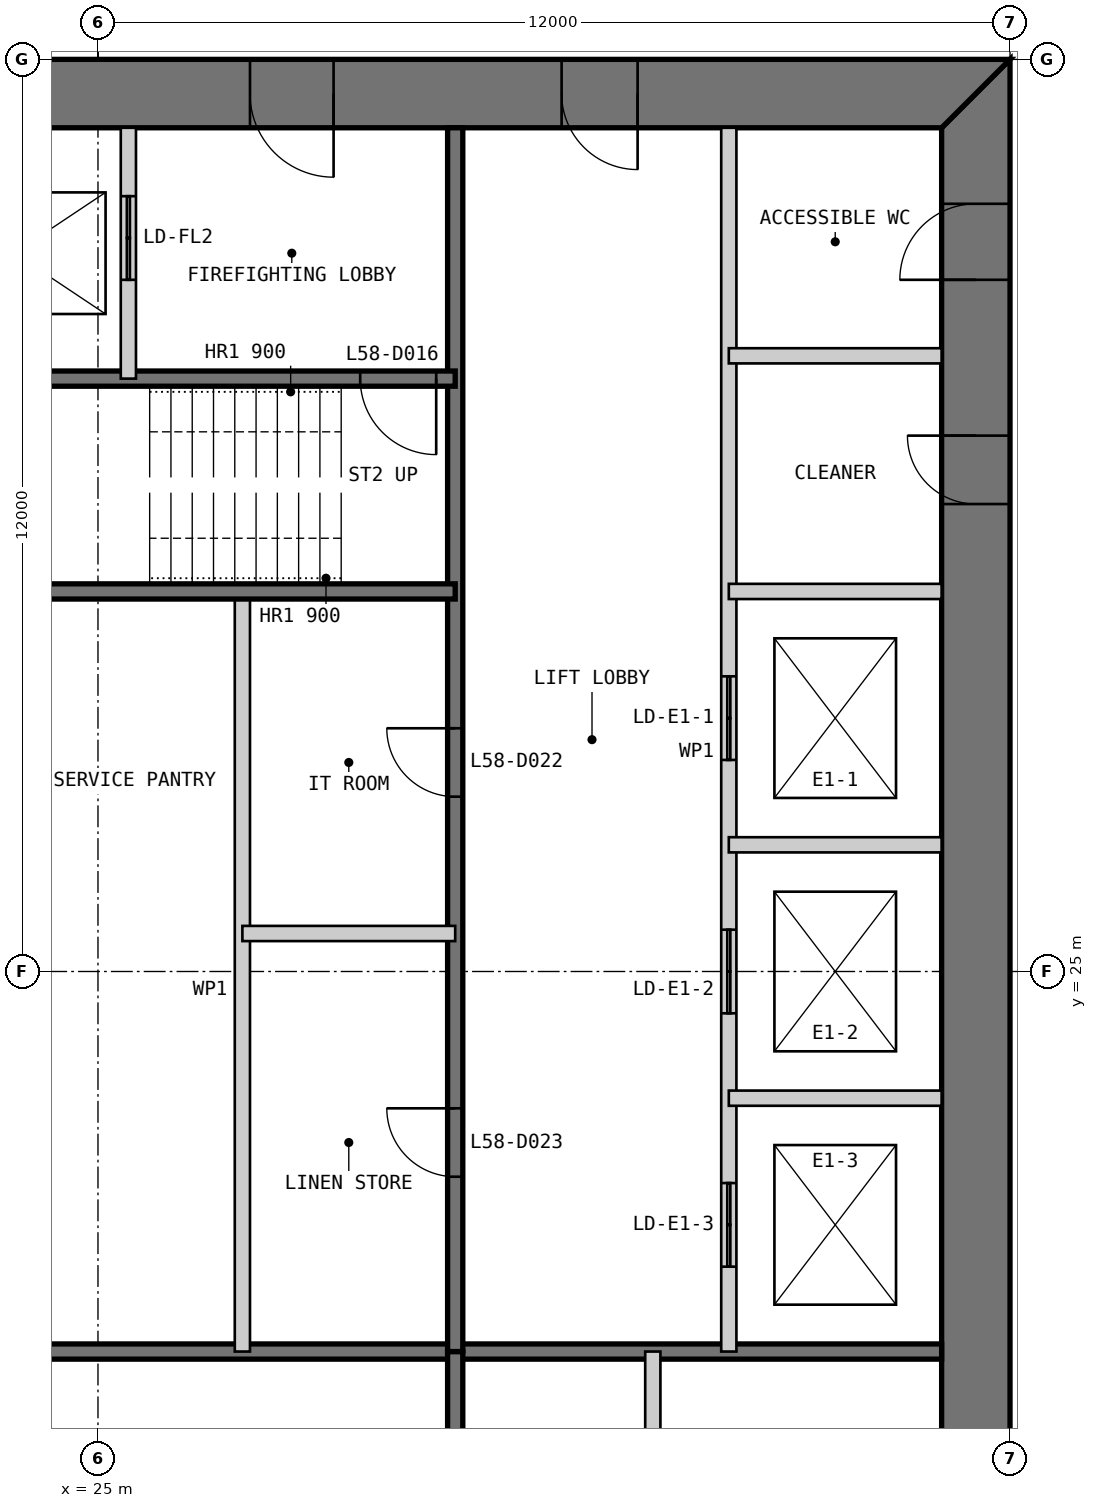
"""IFC4 building model, lengths in metres.
Left out: names, types, materials, properties, quantities, classifications, styles, units other than length and angle.
Written with IfcOpenShell. Run it as: python <this file> out.ifc"""

import sys

from ifc_helpers import new_model, si_unit, direction, frame, frame_2d, origin, place, context, subcontext, project, spatial, polyline, rectangle, outline, extrude, element, fill, save


model = new_model("IFC4")
c1 = context("Model", 3, precision=1e-05, world=origin(), true_north=direction((0.0, 1.0)))
c2 = subcontext(c1, "Body", "Model", "MODEL_VIEW")
j1 = project(units=[si_unit("LENGTHUNIT", "METRE"), si_unit("PLANEANGLEUNIT", "RADIAN")], contexts=[c1])
p1 = place(None, origin())
s1 = spatial("IfcSite", under=j1, at=p1, CompositionType="ELEMENT")
p2 = place(p1, origin())
s2 = spatial("IfcBuilding", under=s1, at=p2, CompositionType="ELEMENT")
p3 = place(p2, frame((0.0, 0.0, 249.2)))
s3 = spatial("IfcBuildingStorey", under=s2, at=p3, CompositionType="ELEMENT", Elevation=249.2)
p4 = place(p3, frame((36.55, 13.9, 0.0), z_axis=(0.0, 0.0, 1.0), x_axis=(0.0, 1.0, 0.0)))
e1 = element("IfcWall", 1, at=p4, inside=s3, PredefinedType="SHEAR", context=c2, shape_type="SweptSolid", body=[
    extrude(outline(polyline([(-0.9, -0.45), (23.1, -0.45), (22.2, 0.45), (0.0, 0.45), (-0.9, -0.45)])), origin(), (0.0, 0.0, 1.0), 3.4),
])
p5 = place(p4, frame((20.2, 0.0, 0.0)))
e2 = element("IfcOpeningElement", 2, at=p5, cuts=e1, PredefinedType="OPENING", context=c2, shape_type="SweptSolid", body=[
    extrude(rectangle(XDim=1.0, YDim=2.2, at=frame_2d((0.5, 1.1))), frame((0.0, 0.46, 0.0), z_axis=(0.0, -1.0, 0.0), x_axis=(1.0, 0.0, 0.0)), (0.0, 0.0, 1.0), 0.92),
])
p6 = place(p4, frame((17.25, 0.0, 0.0)))
e3 = element("IfcOpeningElement", 3, at=p6, cuts=e1, PredefinedType="OPENING", context=c2, shape_type="SweptSolid", body=[
    extrude(rectangle(XDim=0.9, YDim=2.2, at=frame_2d((0.45, 1.1))), frame((0.0, 0.46, 0.0), z_axis=(0.0, -1.0, 0.0), x_axis=(1.0, 0.0, 0.0)), (0.0, 0.0, 1.0), 0.92),
])
p7 = place(p3, frame((37.0, 36.55, 0.0), z_axis=(0.0, 0.0, 1.0), x_axis=(-1.0, 0.0, 0.0)))
e4 = element("IfcWall", 4, at=p7, inside=s3, PredefinedType="SHEAR", context=c2, shape_type="SweptSolid", body=[
    extrude(outline(polyline([(0.0, -0.45), (24.0, -0.45), (23.1, 0.45), (0.9, 0.45), (0.0, -0.45)])), origin(), (0.0, 0.0, 1.0), 3.4),
])
p8 = place(p7, frame((4.9, 0.0, 0.0)))
e5 = element("IfcOpeningElement", 5, at=p8, cuts=e4, PredefinedType="OPENING", context=c2, shape_type="SweptSolid", body=[
    extrude(rectangle(XDim=1.0, YDim=2.2, at=frame_2d((0.5, 1.1))), frame((0.0, 0.46, 0.0), z_axis=(0.0, -1.0, 0.0), x_axis=(1.0, 0.0, 0.0)), (0.0, 0.0, 1.0), 0.92),
])
p9 = place(p7, frame((8.9, 0.0, 0.0)))
e6 = element("IfcOpeningElement", 6, at=p9, cuts=e4, PredefinedType="OPENING", context=c2, shape_type="SweptSolid", body=[
    extrude(rectangle(XDim=1.1, YDim=2.2, at=frame_2d((0.55, 1.1))), frame((0.0, 0.46, 0.0), z_axis=(0.0, -1.0, 0.0), x_axis=(1.0, 0.0, 0.0)), (0.0, 0.0, 1.0), 0.92),
])
p10 = place(p7, frame((15.05, 0.0, 0.0)))
e7 = element("IfcOpeningElement", 7, at=p10, cuts=e4, PredefinedType="OPENING", context=c2, shape_type="SweptSolid", body=[
    extrude(rectangle(XDim=0.9, YDim=2.2, at=frame_2d((0.45, 1.1))), frame((0.0, 0.46, 0.0), z_axis=(0.0, -1.0, 0.0), x_axis=(1.0, 0.0, 0.0)), (0.0, 0.0, 1.0), 0.92),
])
p11 = place(p7, frame((17.9, 0.0, 0.0)))
e8 = element("IfcOpeningElement", 8, at=p11, cuts=e4, PredefinedType="OPENING", context=c2, shape_type="SweptSolid", body=[
    extrude(rectangle(XDim=1.0, YDim=2.2, at=frame_2d((0.5, 1.1))), frame((0.0, 0.46, 0.0), z_axis=(0.0, -1.0, 0.0), x_axis=(1.0, 0.0, 0.0)), (0.0, 0.0, 1.0), 0.92),
])
p12 = place(p7, frame((21.4, 0.0, 0.0)))
e9 = element("IfcOpeningElement", 9, at=p12, cuts=e4, PredefinedType="OPENING", context=c2, shape_type="SweptSolid", body=[
    extrude(rectangle(XDim=1.0, YDim=2.2, at=frame_2d((0.5, 1.1))), frame((0.0, 0.46, 0.0), z_axis=(0.0, -1.0, 0.0), x_axis=(1.0, 0.0, 0.0)), (0.0, 0.0, 1.0), 0.92),
])
p13 = place(p3, frame((20.3, 20.0, 0.0), z_axis=(0.0, 0.0, 1.0), x_axis=(1.0, 0.0, 0.0)))
e10 = element("IfcWall", 10, at=p13, inside=s3, PredefinedType="SOLIDWALL", context=c2, shape_type="SweptSolid", body=[
    extrude(rectangle(XDim=15.8, YDim=0.2, at=frame_2d((7.9, 0.0))), origin(), (0.0, 0.0, 1.0), 3.2),
])
p14 = place(p3, frame((29.7, 13.9, 0.0), z_axis=(0.0, 0.0, 1.0), x_axis=(0.0, 1.0, 0.0)))
e11 = element("IfcWall", 11, at=p14, inside=s3, PredefinedType="SOLIDWALL", context=c2, shape_type="SweptSolid", body=[
    extrude(rectangle(XDim=6.1, YDim=0.2, at=frame_2d((3.05, 0.0))), origin(), (0.0, 0.0, 1.0), 3.2),
])
p15 = place(p3, frame((32.3, 13.9, 0.0), z_axis=(0.0, 0.0, 1.0), x_axis=(0.0, 1.0, 0.0)))
e12 = element("IfcWall", 12, at=p15, inside=s3, PredefinedType="PARTITIONING", context=c2, shape_type="SweptSolid", body=[
    extrude(rectangle(XDim=6.1, YDim=0.2, at=frame_2d((3.05, 0.0))), origin(), (0.0, 0.0, 1.0), 3.2),
])
p16 = place(p3, frame((33.3, 36.1, 0.0), z_axis=(0.0, 0.0, 1.0), x_axis=(0.0, -1.0, 0.0)))
e13 = element("IfcWall", 13, at=p16, inside=s3, PredefinedType="PARTITIONING", context=c2, shape_type="SweptSolid", body=[
    extrude(rectangle(XDim=16.1, YDim=0.2, at=frame_2d((8.05, 0.0))), origin(), (0.0, 0.0, 1.0), 3.2),
])
p17 = place(p16, frame((7.217, 0.0, 0.0)))
e14 = element("IfcOpeningElement", 14, at=p17, cuts=e13, PredefinedType="OPENING", context=c2, shape_type="SweptSolid", body=[
    extrude(rectangle(XDim=1.1, YDim=2.2, at=frame_2d((0.55, 1.1))), frame((0.0, 0.11, 0.0), z_axis=(0.0, -1.0, 0.0), x_axis=(1.0, 0.0, 0.0)), (0.0, 0.0, 1.0), 0.22),
])
p18 = place(p16, frame((10.55, 0.0, 0.0)))
e15 = element("IfcOpeningElement", 15, at=p18, cuts=e13, PredefinedType="OPENING", context=c2, shape_type="SweptSolid", body=[
    extrude(rectangle(XDim=1.1, YDim=2.2, at=frame_2d((0.55, 1.1))), frame((0.0, 0.11, 0.0), z_axis=(0.0, -1.0, 0.0), x_axis=(1.0, 0.0, 0.0)), (0.0, 0.0, 1.0), 0.22),
])
p19 = place(p16, frame((13.883, 0.0, 0.0)))
e16 = element("IfcOpeningElement", 16, at=p19, cuts=e13, PredefinedType="OPENING", context=c2, shape_type="SweptSolid", body=[
    extrude(rectangle(XDim=1.1, YDim=2.2, at=frame_2d((0.55, 1.1))), frame((0.0, 0.11, 0.0), z_axis=(0.0, -1.0, 0.0), x_axis=(1.0, 0.0, 0.0)), (0.0, 0.0, 1.0), 0.22),
])
p20 = place(p3, frame((29.7, 36.1, 0.0), z_axis=(0.0, 0.0, 1.0), x_axis=(0.0, -1.0, 0.0)))
e17 = element("IfcWall", 17, at=p20, inside=s3, PredefinedType="SOLIDWALL", context=c2, shape_type="SweptSolid", body=[
    extrude(rectangle(XDim=16.1, YDim=0.2, at=frame_2d((8.05, 0.0))), origin(), (0.0, 0.0, 1.0), 3.2),
])
p21 = place(p20, frame((7.9, 0.0, 0.0)))
e18 = element("IfcOpeningElement", 18, at=p21, cuts=e17, PredefinedType="OPENING", context=c2, shape_type="SweptSolid", body=[
    extrude(rectangle(XDim=0.9, YDim=2.2, at=frame_2d((0.45, 1.1))), frame((0.0, 0.11, 0.0), z_axis=(0.0, -1.0, 0.0), x_axis=(1.0, 0.0, 0.0)), (0.0, 0.0, 1.0), 0.22),
])
p22 = place(p20, frame((12.9, 0.0, 0.0)))
e19 = element("IfcOpeningElement", 19, at=p22, cuts=e17, PredefinedType="OPENING", context=c2, shape_type="SweptSolid", body=[
    extrude(rectangle(XDim=0.9, YDim=2.2, at=frame_2d((0.45, 1.1))), frame((0.0, 0.11, 0.0), z_axis=(0.0, -1.0, 0.0), x_axis=(1.0, 0.0, 0.0)), (0.0, 0.0, 1.0), 0.22),
])
for number, where, z_axis, x_axis in (
    (20, (36.1, 30.0, 0.0), (0.0, 0.0, 1.0), (-1.0, 0.0, 0.0)),
    (21, (36.1, 26.667, 0.0), (0.0, 0.0, 1.0), (-1.0, 0.0, 0.0)),
    (22, (36.1, 23.333, 0.0), (0.0, 0.0, 1.0), (-1.0, 0.0, 0.0)),
):
    element("IfcWall", number, at=place(p3, frame(where, z_axis=z_axis, x_axis=x_axis)), inside=s3, PredefinedType="PARTITIONING", context=c2, shape_type="SweptSolid", body=[
        extrude(rectangle(XDim=2.8, YDim=0.2, at=frame_2d((1.4, 0.0))), origin(), (0.0, 0.0, 1.0), 3.2),
    ])
p23 = place(p3, frame((26.9, 30.0, 0.0), z_axis=(0.0, 0.0, 1.0), x_axis=(0.0, -1.0, 0.0)))
e23 = element("IfcWall", 23, at=p23, inside=s3, PredefinedType="PARTITIONING", context=c2, shape_type="SweptSolid", body=[
    extrude(rectangle(XDim=10.0, YDim=0.2, at=frame_2d((5.0, 0.0))), origin(), (0.0, 0.0, 1.0), 3.2),
])
p24 = place(p3, frame((29.7, 32.8, 0.0), z_axis=(0.0, 0.0, 1.0), x_axis=(-1.0, 0.0, 0.0)))
e24 = element("IfcWall", 24, at=p24, inside=s3, PredefinedType="SOLIDWALL", context=c2, shape_type="SweptSolid", body=[
    extrude(rectangle(XDim=9.4, YDim=0.2, at=frame_2d((4.7, 0.0))), origin(), (0.0, 0.0, 1.0), 3.2),
])
p25 = place(p24, frame((0.25, 0.0, 0.0)))
e25 = element("IfcOpeningElement", 25, at=p25, cuts=e24, PredefinedType="OPENING", context=c2, shape_type="SweptSolid", body=[
    extrude(rectangle(XDim=1.0, YDim=2.2, at=frame_2d((0.5, 1.1))), frame((0.0, 0.11, 0.0), z_axis=(0.0, -1.0, 0.0), x_axis=(1.0, 0.0, 0.0)), (0.0, 0.0, 1.0), 0.22),
])
p26 = place(p3, frame((29.7, 30.0, 0.0), z_axis=(0.0, 0.0, 1.0), x_axis=(-1.0, 0.0, 0.0)))
e26 = element("IfcWall", 26, at=p26, inside=s3, PredefinedType="SOLIDWALL", context=c2, shape_type="SweptSolid", body=[
    extrude(rectangle(XDim=15.8, YDim=0.2, at=frame_2d((7.9, 0.0))), origin(), (0.0, 0.0, 1.0), 3.2),
])
p27 = place(p3, frame((25.4, 36.1, 0.0), z_axis=(0.0, 0.0, 1.0), x_axis=(0.0, -1.0, 0.0)))
e27 = element("IfcWall", 27, at=p27, inside=s3, PredefinedType="PARTITIONING", context=c2, shape_type="SweptSolid", body=[
    extrude(rectangle(XDim=3.3, YDim=0.2, at=frame_2d((1.65, 0.0))), origin(), (0.0, 0.0, 1.0), 3.2),
])
p28 = place(p27, frame((0.9, 0.0, 0.0)))
e28 = element("IfcOpeningElement", 28, at=p28, cuts=e27, PredefinedType="OPENING", context=c2, shape_type="SweptSolid", body=[
    extrude(rectangle(XDim=1.1, YDim=2.2, at=frame_2d((0.55, 1.1))), frame((0.0, 0.11, 0.0), z_axis=(0.0, -1.0, 0.0), x_axis=(1.0, 0.0, 0.0)), (0.0, 0.0, 1.0), 0.22),
])
for number, where, z_axis, x_axis in (
    (29, (36.1, 33.1, 0.0), (0.0, 0.0, 1.0), (-1.0, 0.0, 0.0)),
    (30, (29.7, 25.5, 0.0), (0.0, 0.0, 1.0), (-1.0, 0.0, 0.0)),
):
    element("IfcWall", number, at=place(p3, frame(where, z_axis=z_axis, x_axis=x_axis)), inside=s3, PredefinedType="PARTITIONING", context=c2, shape_type="SweptSolid", body=[
        extrude(rectangle(XDim=2.8, YDim=0.2, at=frame_2d((1.4, 0.0))), origin(), (0.0, 0.0, 1.0), 3.2),
    ])
p29 = place(p8, origin())
e31 = element("IfcDoor", 31, at=p29, inside=s3, OperationType="SINGLE_SWING_LEFT", PredefinedType="DOOR", context=c2, shape_type="SweptSolid", body=[
    extrude(rectangle(XDim=1.0, YDim=2.2, at=frame_2d((0.5, 1.1))), frame((0.0, 0.025, 0.0), z_axis=(0.0, -1.0, 0.0), x_axis=(1.0, 0.0, 0.0)), (0.0, 0.0, 1.0), 0.05),
    extrude(outline(polyline([(0.0, 0.0), (0.04, 0.0), (0.04, 2.16), (0.96, 2.16), (0.96, 0.0), (1.0, 0.0), (1.0, 2.2), (0.0, 2.2), (0.0, 0.0)])), frame((0.0, 0.3, 0.0), z_axis=(0.0, -1.0, 0.0), x_axis=(1.0, 0.0, 0.0)), (0.0, 0.0, 1.0), 0.6),
])
fill(e5, e31)
p30 = place(p9, origin())
e32 = element("IfcDoor", 32, at=p30, inside=s3, OperationType="SINGLE_SWING_LEFT", PredefinedType="DOOR", context=c2, shape_type="SweptSolid", body=[
    extrude(rectangle(XDim=1.1, YDim=2.2, at=frame_2d((0.55, 1.1))), frame((0.0, 0.025, 0.0), z_axis=(0.0, -1.0, 0.0), x_axis=(1.0, 0.0, 0.0)), (0.0, 0.0, 1.0), 0.05),
    extrude(outline(polyline([(0.0, 0.0), (0.04, 0.0), (0.04, 2.16), (1.06, 2.16), (1.06, 0.0), (1.1, 0.0), (1.1, 2.2), (0.0, 2.2), (0.0, 0.0)])), frame((0.0, 0.3, 0.0), z_axis=(0.0, -1.0, 0.0), x_axis=(1.0, 0.0, 0.0)), (0.0, 0.0, 1.0), 0.6),
])
fill(e6, e32)
p31 = place(p25, origin())
e33 = element("IfcDoor", 33, at=p31, inside=s3, OperationType="SINGLE_SWING_LEFT", PredefinedType="DOOR", context=c2, shape_type="SweptSolid", body=[
    extrude(rectangle(XDim=1.0, YDim=2.2, at=frame_2d((0.5, 1.1))), frame((0.0, 0.025, 0.0), z_axis=(0.0, -1.0, 0.0), x_axis=(1.0, 0.0, 0.0)), (0.0, 0.0, 1.0), 0.05),
])
fill(e25, e33)
p32 = place(p5, origin())
e34 = element("IfcDoor", 34, at=p32, inside=s3, OperationType="SINGLE_SWING_LEFT", PredefinedType="DOOR", context=c2, shape_type="SweptSolid", body=[
    extrude(rectangle(XDim=1.0, YDim=2.2, at=frame_2d((0.5, 1.1))), frame((0.0, 0.025, 0.0), z_axis=(0.0, -1.0, 0.0), x_axis=(1.0, 0.0, 0.0)), (0.0, 0.0, 1.0), 0.05),
    extrude(outline(polyline([(0.0, 0.0), (0.04, 0.0), (0.04, 2.16), (0.96, 2.16), (0.96, 0.0), (1.0, 0.0), (1.0, 2.2), (0.0, 2.2), (0.0, 0.0)])), frame((0.0, 0.3, 0.0), z_axis=(0.0, -1.0, 0.0), x_axis=(1.0, 0.0, 0.0)), (0.0, 0.0, 1.0), 0.6),
])
fill(e2, e34)
p33 = place(p6, origin())
e35 = element("IfcDoor", 35, at=p33, inside=s3, OperationType="SINGLE_SWING_RIGHT", PredefinedType="DOOR", context=c2, shape_type="SweptSolid", body=[
    extrude(rectangle(XDim=0.9, YDim=2.2, at=frame_2d((0.45, 1.1))), frame((0.0, 0.025, 0.0), z_axis=(0.0, -1.0, 0.0), x_axis=(1.0, 0.0, 0.0)), (0.0, 0.0, 1.0), 0.05),
    extrude(outline(polyline([(0.0, 0.0), (0.04, 0.0), (0.04, 2.16), (0.86, 2.16), (0.86, 0.0), (0.9, 0.0), (0.9, 2.2), (0.0, 2.2), (0.0, 0.0)])), frame((0.0, 0.3, 0.0), z_axis=(0.0, -1.0, 0.0), x_axis=(1.0, 0.0, 0.0)), (0.0, 0.0, 1.0), 0.6),
])
fill(e3, e35)
p34 = place(p21, frame((0.9, 0.0, 0.0), z_axis=(0.0, 0.0, 1.0), x_axis=(-1.0, 0.0, 0.0)))
e36 = element("IfcDoor", 36, at=p34, inside=s3, OperationType="SINGLE_SWING_RIGHT", PredefinedType="DOOR", context=c2, shape_type="SweptSolid", body=[
    extrude(rectangle(XDim=0.9, YDim=2.2, at=frame_2d((0.45, 1.1))), frame((0.0, 0.025, 0.0), z_axis=(0.0, -1.0, 0.0), x_axis=(1.0, 0.0, 0.0)), (0.0, 0.0, 1.0), 0.05),
])
fill(e18, e36)
p35 = place(p22, frame((0.9, 0.0, 0.0), z_axis=(0.0, 0.0, 1.0), x_axis=(-1.0, 0.0, 0.0)))
e37 = element("IfcDoor", 37, at=p35, inside=s3, OperationType="SINGLE_SWING_RIGHT", PredefinedType="DOOR", context=c2, shape_type="SweptSolid", body=[
    extrude(rectangle(XDim=0.9, YDim=2.2, at=frame_2d((0.45, 1.1))), frame((0.0, 0.025, 0.0), z_axis=(0.0, -1.0, 0.0), x_axis=(1.0, 0.0, 0.0)), (0.0, 0.0, 1.0), 0.05),
])
fill(e19, e37)
p36 = place(p28, origin())
e38 = element("IfcDoor", 38, at=p36, inside=s3, OperationType="DOUBLE_DOOR_SLIDING", PredefinedType="DOOR", context=c2, shape_type="SweptSolid", body=[
    extrude(rectangle(XDim=1.1, YDim=2.2, at=frame_2d((0.55, 1.1))), frame((0.0, 0.025, 0.0), z_axis=(0.0, -1.0, 0.0), x_axis=(1.0, 0.0, 0.0)), (0.0, 0.0, 1.0), 0.05),
])
fill(e28, e38)
p37 = place(p17, origin())
e39 = element("IfcDoor", 39, at=p37, inside=s3, OperationType="DOUBLE_DOOR_SLIDING", PredefinedType="DOOR", context=c2, shape_type="SweptSolid", body=[
    extrude(rectangle(XDim=1.1, YDim=2.2, at=frame_2d((0.55, 1.1))), frame((0.0, 0.025, 0.0), z_axis=(0.0, -1.0, 0.0), x_axis=(1.0, 0.0, 0.0)), (0.0, 0.0, 1.0), 0.05),
])
fill(e14, e39)
p38 = place(p18, origin())
e40 = element("IfcDoor", 40, at=p38, inside=s3, OperationType="DOUBLE_DOOR_SLIDING", PredefinedType="DOOR", context=c2, shape_type="SweptSolid", body=[
    extrude(rectangle(XDim=1.1, YDim=2.2, at=frame_2d((0.55, 1.1))), frame((0.0, 0.025, 0.0), z_axis=(0.0, -1.0, 0.0), x_axis=(1.0, 0.0, 0.0)), (0.0, 0.0, 1.0), 0.05),
])
fill(e15, e40)
p39 = place(p19, origin())
e41 = element("IfcDoor", 41, at=p39, inside=s3, OperationType="DOUBLE_DOOR_SLIDING", PredefinedType="DOOR", context=c2, shape_type="SweptSolid", body=[
    extrude(rectangle(XDim=1.1, YDim=2.2, at=frame_2d((0.55, 1.1))), frame((0.0, 0.025, 0.0), z_axis=(0.0, -1.0, 0.0), x_axis=(1.0, 0.0, 0.0)), (0.0, 0.0, 1.0), 0.05),
])
fill(e16, e41)
save(model, sys.argv[1])
